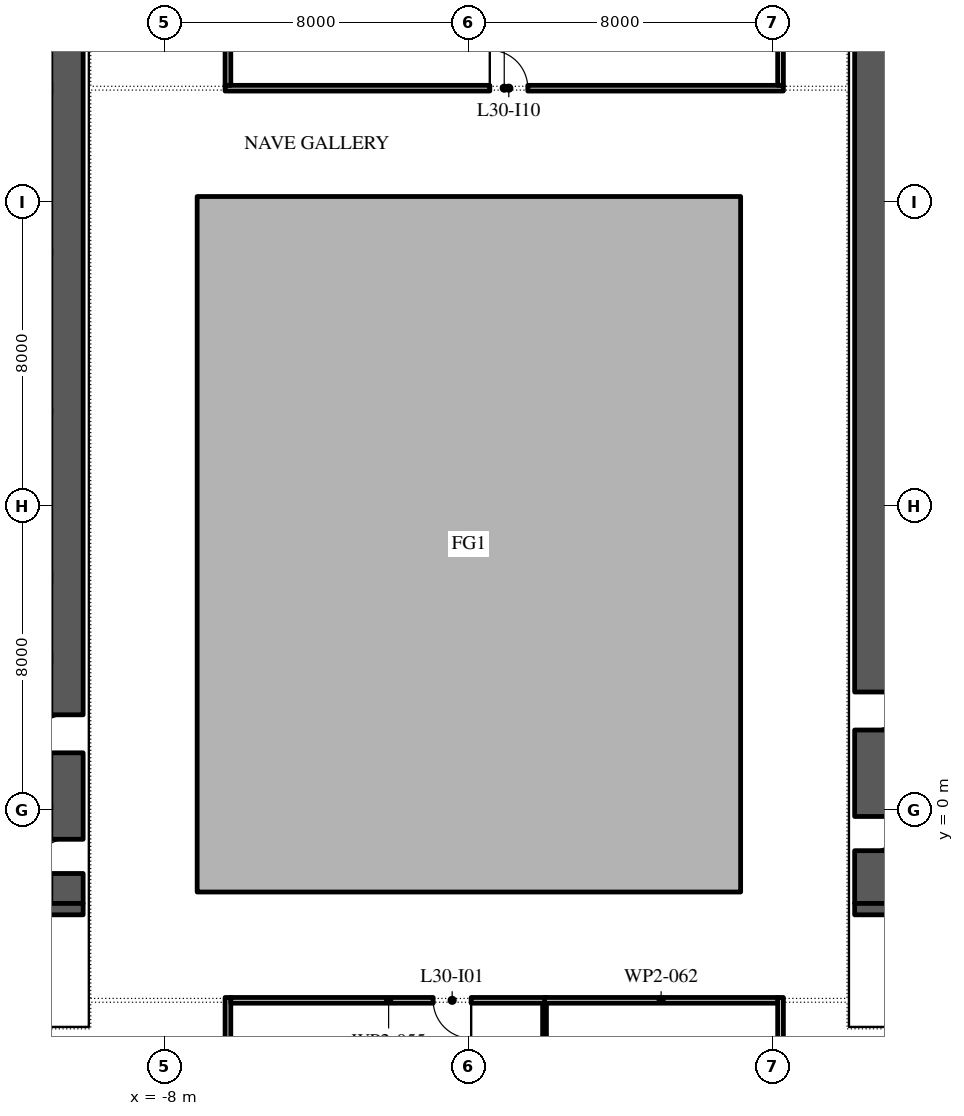
"""IFC4 building model, lengths in metres.
Left out: names, types, materials, properties, quantities, classifications, styles, units other than length and angle.
Written with IfcOpenShell. Run it as: python <this file> out.ifc"""

import sys

from ifc_helpers import new_model, si_unit, direction, frame, frame_2d, origin, place, context, subcontext, project, spatial, polyline, rectangle, outline, extrude, element, fill, save


model = new_model("IFC4")
c1 = context("Model", 3, precision=1e-05, world=origin(), true_north=direction((0.0, 1.0)))
c2 = subcontext(c1, "Body", "Model", "MODEL_VIEW")
j1 = project(units=[si_unit("LENGTHUNIT", "METRE"), si_unit("PLANEANGLEUNIT", "RADIAN")], contexts=[c1])
p1 = place(None, origin())
s1 = spatial("IfcSite", under=j1, at=p1, CompositionType="ELEMENT")
p2 = place(p1, origin())
s2 = spatial("IfcBuilding", under=s1, at=p2, CompositionType="ELEMENT")
p3 = place(p2, frame((0.0, 0.0, 139.2)))
s3 = spatial("IfcBuildingStorey", under=s2, at=p3, CompositionType="ELEMENT", Elevation=139.2)
p4 = place(p3, origin())
e1 = element("IfcWall", 1, at=p4, inside=s3, PredefinedType="STANDARD", context=c2, shape_type="SweptSolid", body=[
    extrude(outline(polyline([(-7.15, -2.15), (7.15, -2.15), (7.15, 16.15), (-7.15, 16.15), (-7.15, -2.15)]), holes=[polyline([(-7.0, -2.0), (-7.0, 16.0), (7.0, 16.0), (7.0, -2.0), (-7.0, -2.0)])]), origin(), (0.0, 0.0, 1.0), 4.0),
])
p5 = place(p3, frame((-10.575, -2.45, 0.0), z_axis=(0.0, 0.0, 1.0), x_axis=(0.0, 1.0, 0.0)))
e2 = element("IfcWall", 2, at=p5, inside=s3, PredefinedType="SHEAR", context=c2, shape_type="SweptSolid", body=[
    extrude(rectangle(XDim=27.9, YDim=0.85, at=frame_2d((13.95, 0.0))), origin(), (0.0, 0.0, 1.0), 4.0),
])
p6 = place(p5, frame((23.65, 0.0, 0.0)))
e3 = element("IfcOpeningElement", 3, at=p6, cuts=e2, PredefinedType="OPENING", context=c2, shape_type="SweptSolid", body=[
    extrude(rectangle(XDim=2.4, YDim=2.1, at=frame_2d((1.2, 1.05))), frame((0.0, 0.435, 0.0), z_axis=(0.0, -1.0, 0.0), x_axis=(1.0, 0.0, 0.0)), (0.0, 0.0, 1.0), 0.87),
])
p7 = place(p5, frame((0.788, 0.0, 0.0)))
e4 = element("IfcOpeningElement", 4, at=p7, cuts=e2, PredefinedType="OPENING", context=c2, shape_type="SweptSolid", body=[
    extrude(rectangle(XDim=0.9, YDim=2.1, at=frame_2d((0.45, 1.05))), frame((0.0, 0.435, 0.0), z_axis=(0.0, -1.0, 0.0), x_axis=(1.0, 0.0, 0.0)), (0.0, 0.0, 1.0), 0.87),
])
p8 = place(p5, frame((3.962, 0.0, 0.0)))
e5 = element("IfcOpeningElement", 5, at=p8, cuts=e2, PredefinedType="OPENING", context=c2, shape_type="SweptSolid", body=[
    extrude(rectangle(XDim=1.0, YDim=2.1, at=frame_2d((0.5, 1.05))), frame((0.0, 0.435, 0.0), z_axis=(0.0, -1.0, 0.0), x_axis=(1.0, 0.0, 0.0)), (0.0, 0.0, 1.0), 0.87),
])
p9 = place(p3, frame((-21.85, -2.6, 0.0), z_axis=(0.0, 0.0, 1.0), x_axis=(1.0, 0.0, 0.0)))
e6 = element("IfcWall", 6, at=p9, inside=s3, PredefinedType="SHEAR", context=c2, shape_type="SweptSolid", body=[
    extrude(rectangle(XDim=11.7, YDim=0.3, at=frame_2d((5.85, 0.0))), origin(), (0.0, 0.0, 1.0), 4.0),
])
p10 = place(p3, frame((10.575, -2.45, 0.0), z_axis=(0.0, 0.0, 1.0), x_axis=(0.0, 1.0, 0.0)))
e7 = element("IfcWall", 7, at=p10, inside=s3, PredefinedType="SHEAR", context=c2, shape_type="SweptSolid", body=[
    extrude(rectangle(XDim=27.9, YDim=0.85, at=frame_2d((13.95, 0.0))), origin(), (0.0, 0.0, 1.0), 4.0),
])
p11 = place(p10, frame((23.65, 0.0, 0.0)))
e8 = element("IfcOpeningElement", 8, at=p11, cuts=e7, PredefinedType="OPENING", context=c2, shape_type="SweptSolid", body=[
    extrude(rectangle(XDim=2.4, YDim=2.1, at=frame_2d((1.2, 1.05))), frame((0.0, 0.435, 0.0), z_axis=(0.0, -1.0, 0.0), x_axis=(1.0, 0.0, 0.0)), (0.0, 0.0, 1.0), 0.87),
])
p12 = place(p10, frame((1.387, 0.0, 0.0)))
e9 = element("IfcOpeningElement", 9, at=p12, cuts=e7, PredefinedType="OPENING", context=c2, shape_type="SweptSolid", body=[
    extrude(rectangle(XDim=0.9, YDim=2.1, at=frame_2d((0.45, 1.05))), frame((0.0, 0.435, 0.0), z_axis=(0.0, -1.0, 0.0), x_axis=(1.0, 0.0, 0.0)), (0.0, 0.0, 1.0), 0.87),
])
p13 = place(p10, frame((4.562, 0.0, 0.0)))
e10 = element("IfcOpeningElement", 10, at=p13, cuts=e7, PredefinedType="OPENING", context=c2, shape_type="SweptSolid", body=[
    extrude(rectangle(XDim=1.0, YDim=2.1, at=frame_2d((0.5, 1.05))), frame((0.0, 0.435, 0.0), z_axis=(0.0, -1.0, 0.0), x_axis=(1.0, 0.0, 0.0)), (0.0, 0.0, 1.0), 0.87),
])
p14 = place(p3, frame((10.15, -2.6, 0.0), z_axis=(0.0, 0.0, 1.0), x_axis=(1.0, 0.0, 0.0)))
e11 = element("IfcWall", 11, at=p14, inside=s3, PredefinedType="SHEAR", context=c2, shape_type="SweptSolid", body=[
    extrude(rectangle(XDim=11.7, YDim=0.3, at=frame_2d((5.85, 0.0))), origin(), (0.0, 0.0, 1.0), 4.0),
])
p15 = place(p3, frame((-6.34, -4.925, 0.0), z_axis=(0.0, 0.0, 1.0), x_axis=(0.0, -1.0, 0.0)))
e12 = element("IfcWall", 12, at=p15, inside=s3, PredefinedType="PARTITIONING", context=c2, shape_type="SweptSolid", body=[
    extrude(rectangle(XDim=2.565, YDim=0.15, at=frame_2d((1.282, 0.0))), origin(), (0.0, 0.0, 1.0), 4.0),
])
p16 = place(p3, frame((-6.415, 19.0, 0.0), z_axis=(0.0, 0.0, 1.0), x_axis=(1.0, 0.0, 0.0)))
e13 = element("IfcWall", 13, at=p16, inside=s3, PredefinedType="PARTITIONING", context=c2, shape_type="SweptSolid", body=[
    extrude(rectangle(XDim=14.69, YDim=0.15, at=frame_2d((7.345, 0.0))), origin(), (0.0, 0.0, 1.0), 4.0),
])
p17 = place(p16, frame((6.965, 0.0, 0.0)))
e14 = element("IfcOpeningElement", 14, at=p17, cuts=e13, PredefinedType="OPENING", context=c2, shape_type="SweptSolid", body=[
    extrude(rectangle(XDim=1.0, YDim=2.1, at=frame_2d((0.5, 1.05))), frame((0.0, 0.085, 0.0), z_axis=(0.0, -1.0, 0.0), x_axis=(1.0, 0.0, 0.0)), (0.0, 0.0, 1.0), 0.17),
])
p18 = place(p3, frame((-6.34, 23.46, 0.0), z_axis=(0.0, 0.0, 1.0), x_axis=(0.0, -1.0, 0.0)))
e15 = element("IfcWall", 15, at=p18, inside=s3, PredefinedType="PARTITIONING", context=c2, shape_type="SweptSolid", body=[
    extrude(rectangle(XDim=4.385, YDim=0.15, at=frame_2d((2.192, 0.0))), origin(), (0.0, 0.0, 1.0), 4.0),
])
p19 = place(p3, frame((2.04, -5.0, 0.0), z_axis=(0.0, 0.0, 1.0), x_axis=(-1.0, 0.0, 0.0)))
e16 = element("IfcWall", 16, at=p19, inside=s3, PredefinedType="PARTITIONING", context=c2, shape_type="SweptSolid", body=[
    extrude(rectangle(XDim=8.305, YDim=0.15, at=frame_2d((4.152, 0.0))), origin(), (0.0, 0.0, 1.0), 4.0),
])
p20 = place(p19, frame((1.98, 0.0, 0.0)))
e17 = element("IfcOpeningElement", 17, at=p20, cuts=e16, PredefinedType="OPENING", context=c2, shape_type="SweptSolid", body=[
    extrude(rectangle(XDim=1.0, YDim=2.1, at=frame_2d((0.5, 1.05))), frame((0.0, 0.085, 0.0), z_axis=(0.0, -1.0, 0.0), x_axis=(1.0, 0.0, 0.0)), (0.0, 0.0, 1.0), 0.17),
])
p21 = place(p3, frame((1.99, -5.075, 0.0), z_axis=(0.0, 0.0, 1.0), x_axis=(0.0, -1.0, 0.0)))
e18 = element("IfcWall", 18, at=p21, inside=s3, PredefinedType="PARTITIONING", context=c2, shape_type="SweptSolid", body=[
    extrude(rectangle(XDim=5.875, YDim=0.1, at=frame_2d((2.938, 0.0))), origin(), (0.0, 0.0, 1.0), 4.0),
])
p22 = place(p3, frame((8.2, -7.575, 0.0), z_axis=(0.0, 0.0, 1.0), x_axis=(0.0, 1.0, 0.0)))
e19 = element("IfcWall", 19, at=p22, inside=s3, PredefinedType="PARTITIONING", context=c2, shape_type="SweptSolid", body=[
    extrude(rectangle(XDim=2.65, YDim=0.15, at=frame_2d((1.325, 0.0))), origin(), (0.0, 0.0, 1.0), 4.0),
])
p23 = place(p3, frame((8.125, -5.0, 0.0), z_axis=(0.0, 0.0, 1.0), x_axis=(-1.0, 0.0, 0.0)))
e20 = element("IfcWall", 20, at=p23, inside=s3, PredefinedType="PARTITIONING", context=c2, shape_type="SweptSolid", body=[
    extrude(rectangle(XDim=6.135, YDim=0.15, at=frame_2d((3.067, 0.0))), origin(), (0.0, 0.0, 1.0), 4.0),
])
p24 = place(p3, frame((8.2, 19.075, 0.0), z_axis=(0.0, 0.0, 1.0), x_axis=(0.0, 1.0, 0.0)))
e21 = element("IfcWall", 21, at=p24, inside=s3, PredefinedType="PARTITIONING", context=c2, shape_type="SweptSolid", body=[
    extrude(rectangle(XDim=4.285, YDim=0.15, at=frame_2d((2.143, 0.0))), origin(), (0.0, 0.0, 1.0), 4.0),
])
p25 = place(p7, origin())
e22 = element("IfcDoor", 22, at=p25, inside=s3, OperationType="SINGLE_SWING_RIGHT", PredefinedType="DOOR", context=c2, shape_type="SweptSolid", body=[
    extrude(rectangle(XDim=0.9, YDim=2.1, at=frame_2d((0.45, 1.05))), frame((0.0, 0.425, 0.0), z_axis=(0.0, -1.0, 0.0), x_axis=(1.0, 0.0, 0.0)), (0.0, 0.0, 1.0), 0.05),
])
fill(e4, e22)
p26 = place(p8, origin())
e23 = element("IfcDoor", 23, at=p26, inside=s3, OperationType="SINGLE_SWING_RIGHT", PredefinedType="DOOR", context=c2, shape_type="SweptSolid", body=[
    extrude(rectangle(XDim=1.0, YDim=2.1, at=frame_2d((0.5, 1.05))), frame((0.0, 0.425, 0.0), z_axis=(0.0, -1.0, 0.0), x_axis=(1.0, 0.0, 0.0)), (0.0, 0.0, 1.0), 0.05),
])
fill(e5, e23)
p27 = place(p12, frame((0.9, -0.8, 0.0), z_axis=(0.0, 0.0, 1.0), x_axis=(-1.0, 0.0, 0.0)))
e24 = element("IfcDoor", 24, at=p27, inside=s3, OperationType="SINGLE_SWING_RIGHT", PredefinedType="DOOR", context=c2, shape_type="SweptSolid", body=[
    extrude(rectangle(XDim=0.9, YDim=2.1, at=frame_2d((0.45, 1.05))), frame((0.0, -0.375, 0.0), z_axis=(0.0, -1.0, 0.0), x_axis=(1.0, 0.0, 0.0)), (0.0, 0.0, 1.0), 0.05),
])
fill(e9, e24)
p28 = place(p13, frame((1.0, -0.8, 0.0), z_axis=(0.0, 0.0, 1.0), x_axis=(-1.0, 0.0, 0.0)))
e25 = element("IfcDoor", 25, at=p28, inside=s3, OperationType="SINGLE_SWING_RIGHT", PredefinedType="DOOR", context=c2, shape_type="SweptSolid", body=[
    extrude(rectangle(XDim=1.0, YDim=2.1, at=frame_2d((0.5, 1.05))), frame((0.0, -0.375, 0.0), z_axis=(0.0, -1.0, 0.0), x_axis=(1.0, 0.0, 0.0)), (0.0, 0.0, 1.0), 0.05),
])
fill(e10, e25)
p29 = place(p20, origin())
e26 = element("IfcDoor", 26, at=p29, inside=s3, OperationType="SINGLE_SWING_RIGHT", PredefinedType="DOOR", context=c2, shape_type="SweptSolid", body=[
    extrude(rectangle(XDim=1.0, YDim=2.1, at=frame_2d((0.5, 1.05))), frame((0.0, 0.025, 0.0), z_axis=(0.0, -1.0, 0.0), x_axis=(1.0, 0.0, 0.0)), (0.0, 0.0, 1.0), 0.05),
])
fill(e17, e26)
p30 = place(p17, origin())
e27 = element("IfcDoor", 27, at=p30, inside=s3, OperationType="SINGLE_SWING_RIGHT", PredefinedType="DOOR", context=c2, shape_type="SweptSolid", body=[
    extrude(rectangle(XDim=1.0, YDim=2.1, at=frame_2d((0.5, 1.05))), frame((0.0, 0.025, 0.0), z_axis=(0.0, -1.0, 0.0), x_axis=(1.0, 0.0, 0.0)), (0.0, 0.0, 1.0), 0.05),
])
fill(e14, e27)
save(model, sys.argv[1])
